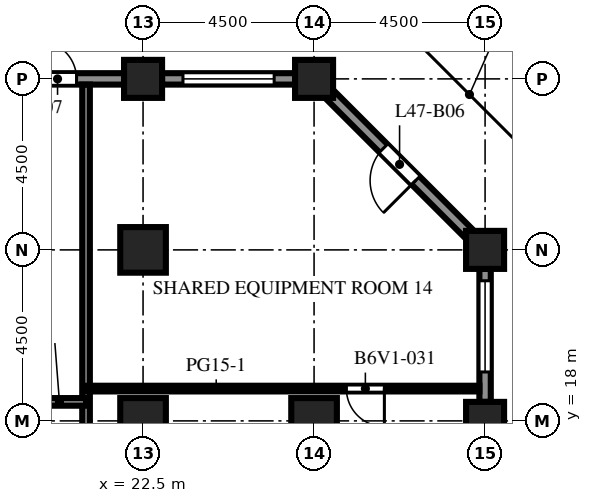
"""IFC4 building model, lengths in metres.
Left out: names, types, materials, properties, quantities, classifications, styles, units other than length and angle.
Written with IfcOpenShell. Run it as: python <this file> out.ifc"""

import sys

from ifc_helpers import new_model, si_unit, direction, frame, frame_2d, origin, origin_2d, place, context, subcontext, project, spatial, rectangle, extrude, element, fill, save


model = new_model("IFC4")
c1 = context("Model", 3, precision=1e-05, world=origin(), true_north=direction((0.0, 1.0)))
c2 = subcontext(c1, "Body", "Model", "MODEL_VIEW")
j1 = project(units=[si_unit("LENGTHUNIT", "METRE"), si_unit("PLANEANGLEUNIT", "RADIAN")], contexts=[c1])
p1 = place(None, origin())
s1 = spatial("IfcSite", under=j1, at=p1, CompositionType="ELEMENT")
p2 = place(p1, origin())
s2 = spatial("IfcBuilding", under=s1, at=p2, CompositionType="ELEMENT")
p3 = place(p2, frame((0.0, 0.0, 207.9)))
s3 = spatial("IfcBuildingStorey", under=s2, at=p3, CompositionType="ELEMENT", Elevation=207.9)
for number, where, z_axis, x_axis in (
    (1, (22.5, 27.0, 0.0), (0.0, 0.0, 1.0), (1.0, 0.0, 0.0)),
    (2, (27.0, 27.0, 0.0), (0.0, 0.0, 1.0), (1.0, 0.0, 0.0)),
    (3, (31.5, 18.0, 0.0), (0.0, 0.0, 1.0), (1.0, 0.0, 0.0)),
    (4, (31.5, 22.5, 0.0), (0.0, 0.0, 1.0), (1.0, 0.0, 0.0)),
):
    element("IfcColumn", number, at=place(p3, frame(where, z_axis=z_axis, x_axis=x_axis)), inside=s3, PredefinedType="COLUMN", context=c2, shape_type="SweptSolid", body=[
        extrude(rectangle(XDim=1.0, YDim=1.0, at=origin_2d()), origin(), (0.0, 0.0, 1.0), 4.1),
    ])
for number, where, z_axis, x_axis in (
    (5, (22.5, 18.0, 0.0), (0.0, 0.0, 1.0), (1.0, 0.0, 0.0)),
    (6, (22.5, 22.5, 0.0), (0.0, 0.0, 1.0), (1.0, 0.0, 0.0)),
    (7, (27.0, 18.0, 0.0), (0.0, 0.0, 1.0), (1.0, 0.0, 0.0)),
):
    element("IfcColumn", number, at=place(p3, frame(where, z_axis=z_axis, x_axis=x_axis)), inside=s3, PredefinedType="COLUMN", context=c2, shape_type="SweptSolid", body=[
        extrude(rectangle(XDim=1.2, YDim=1.2, at=origin_2d()), origin(), (0.0, 0.0, 1.0), 4.1),
    ])
p4 = place(p3, frame((31.5, 22.0, 0.0), z_axis=(0.0, 0.0, 1.0), x_axis=(0.0, -1.0, 0.0)))
e8 = element("IfcWall", 8, at=p4, inside=s3, PredefinedType="SOLIDWALL", context=c2, shape_type="SweptSolid", body=[
    extrude(rectangle(XDim=3.5, YDim=0.3, at=frame_2d((1.75, 0.0))), origin(), (0.0, 0.0, 1.0), 2.85),
])
p5 = place(p4, frame((0.312, 0.0, 0.8)))
e9 = element("IfcOpeningElement", 9, at=p5, cuts=e8, PredefinedType="OPENING", context=c2, shape_type="SweptSolid", body=[
    extrude(rectangle(XDim=2.4, YDim=1.7, at=frame_2d((1.2, 0.85))), frame((0.0, 0.16, 0.0), z_axis=(0.0, -1.0, 0.0), x_axis=(1.0, 0.0, 0.0)), (0.0, 0.0, 1.0), 0.32),
])
p6 = place(p3, frame((27.394, 26.606, 0.0), z_axis=(0.0, 0.0, 1.0), x_axis=(0.707106781187, -0.707106781187, 0.0)))
e10 = element("IfcWall", 10, at=p6, inside=s3, PredefinedType="SOLIDWALL", context=c2, shape_type="SweptSolid", body=[
    extrude(rectangle(XDim=5.25, YDim=0.3, at=frame_2d((2.625, 0.0))), origin(), (0.0, 0.0, 1.0), 2.85),
])
p7 = place(p6, frame((2.025, 0.0, 0.0)))
e11 = element("IfcOpeningElement", 11, at=p7, cuts=e10, PredefinedType="OPENING", context=c2, shape_type="SweptSolid", body=[
    extrude(rectangle(XDim=1.2, YDim=2.2, at=frame_2d((0.6, 1.1))), frame((0.0, 0.16, 0.0), z_axis=(0.0, -1.0, 0.0), x_axis=(1.0, 0.0, 0.0)), (0.0, 0.0, 1.0), 0.32),
])
p8 = place(p3, frame((23.0, 27.0, 0.0), z_axis=(0.0, 0.0, 1.0), x_axis=(1.0, 0.0, 0.0)))
e12 = element("IfcWall", 12, at=p8, inside=s3, PredefinedType="SOLIDWALL", context=c2, shape_type="SweptSolid", body=[
    extrude(rectangle(XDim=3.5, YDim=0.3, at=frame_2d((1.75, 0.0))), origin(), (0.0, 0.0, 1.0), 2.85),
])
p9 = place(p8, frame((0.55, 0.0, 0.8)))
e13 = element("IfcOpeningElement", 13, at=p9, cuts=e12, PredefinedType="OPENING", context=c2, shape_type="SweptSolid", body=[
    extrude(rectangle(XDim=2.4, YDim=1.7, at=frame_2d((1.2, 0.85))), frame((0.0, 0.16, 0.0), z_axis=(0.0, -1.0, 0.0), x_axis=(1.0, 0.0, 0.0)), (0.0, 0.0, 1.0), 0.32),
])
p10 = place(p3, frame((18.5, 27.0, 0.0), z_axis=(0.0, 0.0, 1.0), x_axis=(1.0, 0.0, 0.0)))
e14 = element("IfcWall", 14, at=p10, inside=s3, PredefinedType="SOLIDWALL", context=c2, shape_type="SweptSolid", body=[
    extrude(rectangle(XDim=3.5, YDim=0.3, at=frame_2d((1.75, 0.0))), origin(), (0.0, 0.0, 1.0), 2.85),
])
p11 = place(p10, frame((1.25, 0.0, 0.0)))
e15 = element("IfcOpeningElement", 15, at=p11, cuts=e14, PredefinedType="OPENING", context=c2, shape_type="SweptSolid", body=[
    extrude(rectangle(XDim=1.0, YDim=2.2, at=frame_2d((0.5, 1.1))), frame((0.0, 0.16, 0.0), z_axis=(0.0, -1.0, 0.0), x_axis=(1.0, 0.0, 0.0)), (0.0, 0.0, 1.0), 0.32),
])
p12 = place(p3, frame((21.0, 6.25, 0.0), z_axis=(0.0, 0.0, 1.0), x_axis=(0.0, 1.0, 0.0)))
e16 = element("IfcWall", 16, at=p12, inside=s3, PredefinedType="PARTITIONING", context=c2, shape_type="SweptSolid", body=[
    extrude(rectangle(XDim=20.6, YDim=0.2, at=frame_2d((10.3, 0.0))), origin(), (0.0, 0.0, 1.0), 3.65),
])
p13 = place(p3, frame((18.0, 18.5, 0.0), z_axis=(0.0, 0.0, 1.0), x_axis=(1.0, 0.0, 0.0)))
e17 = element("IfcWall", 17, at=p13, inside=s3, PredefinedType="PARTITIONING", context=c2, shape_type="SweptSolid", body=[
    extrude(rectangle(XDim=3.0, YDim=0.2, at=frame_2d((1.5, 0.0))), origin(), (0.0, 0.0, 1.0), 3.65),
])
p14 = place(p13, frame((0.6, 0.0, 0.0)))
e18 = element("IfcOpeningElement", 18, at=p14, cuts=e17, PredefinedType="OPENING", context=c2, shape_type="SweptSolid", body=[
    extrude(rectangle(XDim=1.0, YDim=2.1, at=frame_2d((0.5, 1.05))), frame((0.0, 0.11, 0.0), z_axis=(0.0, -1.0, 0.0), x_axis=(1.0, 0.0, 0.0)), (0.0, 0.0, 1.0), 0.22),
])
p15 = place(p3, frame((21.0, 18.85, 0.0), z_axis=(0.0, 0.0, 1.0), x_axis=(1.0, 0.0, 0.0)))
e19 = element("IfcWall", 19, at=p15, inside=s3, PredefinedType="PARTITIONING", context=c2, shape_type="SweptSolid", body=[
    extrude(rectangle(XDim=10.35, YDim=0.15, at=frame_2d((5.175, 0.0))), origin(), (0.0, 0.0, 1.0), 3.65),
])
p16 = place(p15, frame((6.85, 0.0, 0.0)))
e20 = element("IfcOpeningElement", 20, at=p16, cuts=e19, PredefinedType="OPENING", context=c2, shape_type="SweptSolid", body=[
    extrude(rectangle(XDim=1.0, YDim=2.1, at=frame_2d((0.5, 1.05))), frame((0.0, 0.085, 0.0), z_axis=(0.0, -1.0, 0.0), x_axis=(1.0, 0.0, 0.0)), (0.0, 0.0, 1.0), 0.17),
])
p17 = place(p5, origin())
e21 = element("IfcWindow", 21, at=p17, inside=s3, PartitioningType="SINGLE_PANEL", PredefinedType="WINDOW", context=c2, shape_type="SweptSolid", body=[
    extrude(rectangle(XDim=2.4, YDim=1.7, at=frame_2d((1.2, 0.85))), frame((0.0, 0.03, 0.0), z_axis=(0.0, -1.0, 0.0), x_axis=(1.0, 0.0, 0.0)), (0.0, 0.0, 1.0), 0.06),
])
fill(e9, e21)
p18 = place(p7, origin())
e22 = element("IfcDoor", 22, at=p18, inside=s3, OperationType="SINGLE_SWING_RIGHT", PredefinedType="DOOR", context=c2, shape_type="SweptSolid", body=[
    extrude(rectangle(XDim=1.2, YDim=2.2, at=frame_2d((0.6, 1.1))), frame((0.0, 0.025, 0.0), z_axis=(0.0, -1.0, 0.0), x_axis=(1.0, 0.0, 0.0)), (0.0, 0.0, 1.0), 0.05),
])
fill(e11, e22)
p19 = place(p9, origin())
e23 = element("IfcWindow", 23, at=p19, inside=s3, PartitioningType="SINGLE_PANEL", PredefinedType="WINDOW", context=c2, shape_type="SweptSolid", body=[
    extrude(rectangle(XDim=2.4, YDim=1.7, at=frame_2d((1.2, 0.85))), frame((0.0, 0.03, 0.0), z_axis=(0.0, -1.0, 0.0), x_axis=(1.0, 0.0, 0.0)), (0.0, 0.0, 1.0), 0.06),
])
fill(e13, e23)
p20 = place(p11, origin())
e24 = element("IfcDoor", 24, at=p20, inside=s3, OperationType="SINGLE_SWING_LEFT", PredefinedType="DOOR", context=c2, shape_type="SweptSolid", body=[
    extrude(rectangle(XDim=1.0, YDim=2.2, at=frame_2d((0.5, 1.1))), frame((0.0, 0.025, 0.0), z_axis=(0.0, -1.0, 0.0), x_axis=(1.0, 0.0, 0.0)), (0.0, 0.0, 1.0), 0.05),
])
fill(e15, e24)
p21 = place(p16, origin())
e25 = element("IfcDoor", 25, at=p21, inside=s3, OperationType="SINGLE_SWING_RIGHT", PredefinedType="DOOR", context=c2, shape_type="SweptSolid", body=[
    extrude(rectangle(XDim=1.0, YDim=2.1, at=frame_2d((0.5, 1.05))), frame((0.0, 0.025, 0.0), z_axis=(0.0, -1.0, 0.0), x_axis=(1.0, 0.0, 0.0)), (0.0, 0.0, 1.0), 0.05),
])
fill(e20, e25)
save(model, sys.argv[1])
